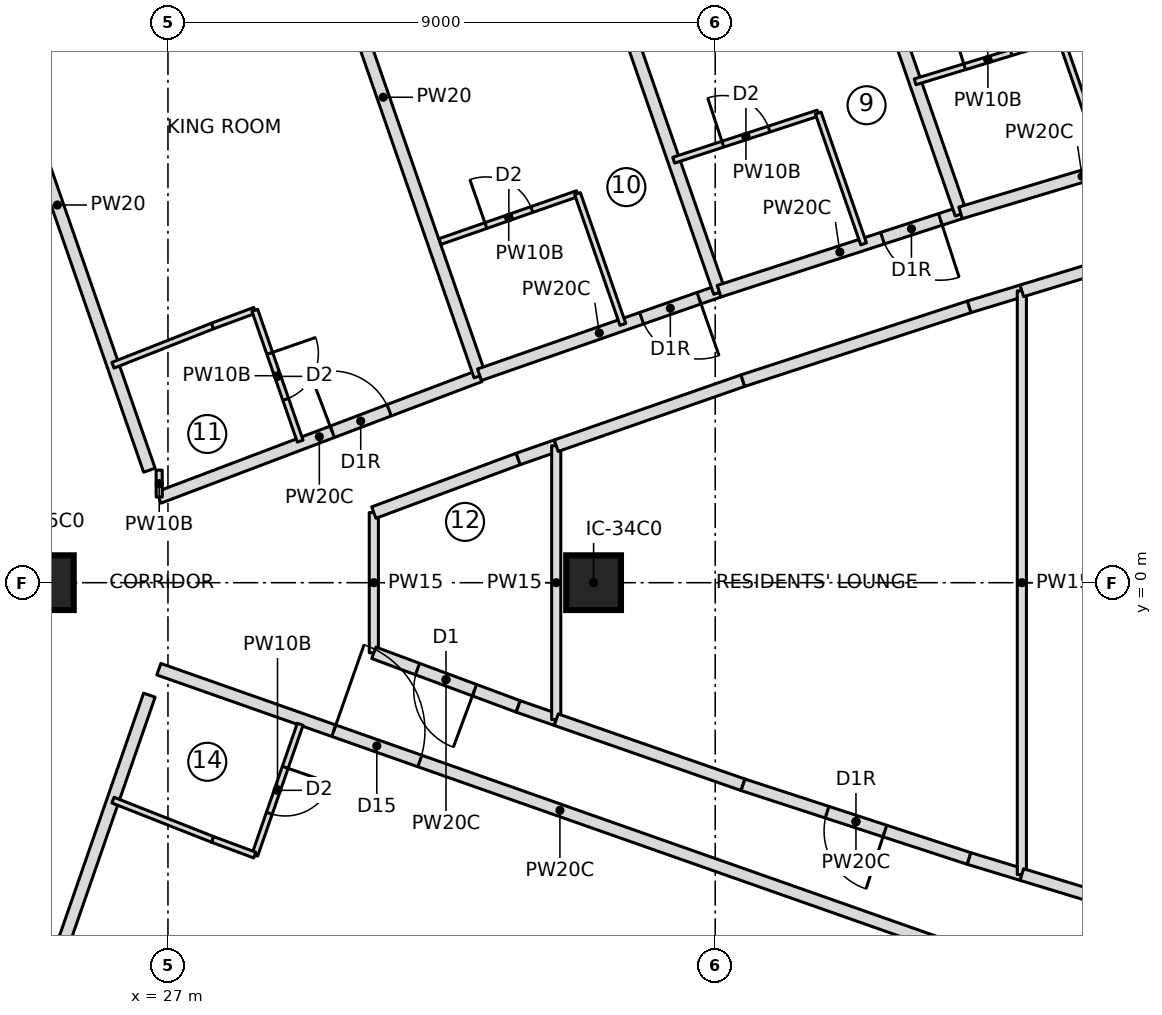
"""IFC4 building model, lengths in metres.
Left out: names, types, materials, properties, quantities, classifications, styles, units other than length and angle.
Written with IfcOpenShell. Run it as: python <this file> out.ifc"""

import sys

from ifc_helpers import new_model, si_unit, direction, frame, frame_2d, origin, origin_2d, place, context, subcontext, project, spatial, rectangle, extrude, element, fill, save


model = new_model("IFC4")
c1 = context("Model", 3, precision=1e-05, world=origin(), true_north=direction((0.0, 1.0)))
c2 = subcontext(c1, "Body", "Model", "MODEL_VIEW")
j1 = project(units=[si_unit("LENGTHUNIT", "METRE"), si_unit("PLANEANGLEUNIT", "RADIAN")], contexts=[c1])
p1 = place(None, origin())
s1 = spatial("IfcSite", under=j1, at=p1, CompositionType="ELEMENT")
p2 = place(p1, origin())
s2 = spatial("IfcBuilding", under=s1, at=p2, CompositionType="ELEMENT")
p3 = place(p2, frame((0.0, 0.0, 289.2)))
s3 = spatial("IfcBuildingStorey", under=s2, at=p3, CompositionType="ELEMENT", Elevation=289.2)
for number, where, z_axis, x_axis in (
    (1, (25.0, 0.0, 0.0), (0.0, 0.0, 1.0), (1.0, 0.0, 0.0)),
    (2, (34.0, 0.0, 0.0), (0.0, 0.0, 1.0), (1.0, 0.0, 0.0)),
):
    element("IfcColumn", number, at=place(p3, frame(where, z_axis=z_axis, x_axis=x_axis)), inside=s3, PredefinedType="COLUMN", context=c2, shape_type="SweptSolid", body=[
        extrude(rectangle(XDim=0.9, YDim=0.9, at=origin_2d()), origin(), (0.0, 0.0, 1.0), 3.55),
    ])
p4 = place(p3, frame((26.694, 1.85, 0.0), z_axis=(0.0, 0.0, 1.0), x_axis=(-0.327714422317, 0.944776829418, 0.0)))
e3 = element("IfcWall", 3, at=p4, inside=s3, PredefinedType="PARTITIONING", context=c2, shape_type="SweptSolid", body=[
    extrude(rectangle(XDim=9.233, YDim=0.2, at=frame_2d((4.617, 0.0))), origin(), (0.0, 0.0, 1.0), 3.25),
])
p5 = place(p3, frame((26.85, 1.401, 0.0), z_axis=(0.0, 0.0, 1.0), x_axis=(0.935181367748, 0.354169181912, 0.0)))
e4 = element("IfcWall", 4, at=p5, inside=s3, PredefinedType="PARTITIONING", context=c2, shape_type="SweptSolid", body=[
    extrude(rectangle(XDim=5.645, YDim=0.2, at=frame_2d((2.823, 0.0))), origin(), (0.0, 0.0, 1.0), 3.25),
])
p6 = place(p5, frame((3.05, 0.0, 0.0)))
e5 = element("IfcOpeningElement", 5, at=p6, cuts=e4, PredefinedType="OPENING", context=c2, shape_type="SweptSolid", body=[
    extrude(rectangle(XDim=1.0, YDim=2.1, at=frame_2d((0.5, 1.05))), frame((0.0, 0.11, 0.0), z_axis=(0.0, -1.0, 0.0), x_axis=(1.0, 0.0, 0.0)), (0.0, 0.0, 1.0), 0.22),
])
p7 = place(p3, frame((26.096, 3.576, 0.0), z_axis=(0.0, 0.0, 1.0), x_axis=(0.930254925629, 0.366913850028, 0.0)))
e6 = element("IfcWall", 6, at=p7, inside=s3, PredefinedType="PARTITIONING", context=c2, shape_type="SweptSolid", body=[
    extrude(rectangle(XDim=1.76, YDim=0.1, at=frame_2d((0.88, 0.0))), origin(), (0.0, 0.0, 1.0), 3.25),
])
p8 = place(p3, frame((27.733, 4.222, 0.0), z_axis=(0.0, 0.0, 1.0), x_axis=(0.937514267289, 0.347946833049, 0.0)))
e7 = element("IfcWall", 7, at=p8, inside=s3, PredefinedType="PARTITIONING", context=c2, shape_type="SweptSolid", body=[
    extrude(rectangle(XDim=0.742, YDim=0.1, at=frame_2d((0.371, 0.0))), origin(), (0.0, 0.0, 1.0), 3.25),
])
p9 = place(p3, frame((28.428, 4.48, 0.0), z_axis=(0.0, 0.0, 1.0), x_axis=(0.327718024288, -0.944775579996, 0.0)))
e8 = element("IfcWall", 8, at=p9, inside=s3, PredefinedType="PARTITIONING", context=c2, shape_type="SweptSolid", body=[
    extrude(rectangle(XDim=2.277, YDim=0.1, at=frame_2d((1.139, 0.0))), origin(), (0.0, 0.0, 1.0), 3.25),
])
p10 = place(p9, frame((0.75, 0.0, 0.0)))
e9 = element("IfcOpeningElement", 9, at=p10, cuts=e8, PredefinedType="OPENING", context=c2, shape_type="SweptSolid", body=[
    extrude(rectangle(XDim=0.8, YDim=2.1, at=frame_2d((0.4, 1.05))), frame((0.0, 0.06, 0.0), z_axis=(0.0, -1.0, 0.0), x_axis=(1.0, 0.0, 0.0)), (0.0, 0.0, 1.0), 0.12),
])
p11 = place(p3, frame((32.129, 3.401, 0.0), z_axis=(0.0, 0.0, 1.0), x_axis=(-0.327724115377, 0.944773467134, 0.0)))
e10 = element("IfcWall", 10, at=p11, inside=s3, PredefinedType="PARTITIONING", context=c2, shape_type="SweptSolid", body=[
    extrude(rectangle(XDim=9.702, YDim=0.2, at=frame_2d((4.851, 0.0))), origin(), (0.0, 0.0, 1.0), 3.25),
])
p12 = place(p3, frame((36.064, 4.794, 0.0), z_axis=(0.0, 0.0, 1.0), x_axis=(-0.944236129554, -0.329269086986, 0.0)))
e11 = element("IfcWall", 11, at=p12, inside=s3, PredefinedType="PARTITIONING", context=c2, shape_type="SweptSolid", body=[
    extrude(rectangle(XDim=4.174, YDim=0.2, at=frame_2d((2.087, 0.0))), origin(), (0.0, 0.0, 1.0), 3.25),
])
p13 = place(p12, frame((0.35, 0.0, 0.0)))
e12 = element("IfcOpeningElement", 12, at=p13, cuts=e11, PredefinedType="OPENING", context=c2, shape_type="SweptSolid", body=[
    extrude(rectangle(XDim=1.0, YDim=2.1, at=frame_2d((0.5, 1.05))), frame((0.0, 0.11, 0.0), z_axis=(0.0, -1.0, 0.0), x_axis=(1.0, 0.0, 0.0)), (0.0, 0.0, 1.0), 0.22),
])
p14 = place(p3, frame((31.473, 5.611, 0.0), z_axis=(0.0, 0.0, 1.0), x_axis=(0.944305532659, 0.329069994059, 0.0)))
e13 = element("IfcWall", 13, at=p14, inside=s3, PredefinedType="PARTITIONING", context=c2, shape_type="SweptSolid", body=[
    extrude(rectangle(XDim=2.396, YDim=0.1, at=frame_2d((1.198, 0.0))), origin(), (0.0, 0.0, 1.0), 3.25),
])
p15 = place(p14, frame((0.8, 0.0, 0.0)))
e14 = element("IfcOpeningElement", 14, at=p15, cuts=e13, PredefinedType="OPENING", context=c2, shape_type="SweptSolid", body=[
    extrude(rectangle(XDim=0.8, YDim=2.1, at=frame_2d((0.4, 1.05))), frame((0.0, 0.06, 0.0), z_axis=(0.0, -1.0, 0.0), x_axis=(1.0, 0.0, 0.0)), (0.0, 0.0, 1.0), 0.12),
])
p16 = place(p3, frame((33.735, 6.399, 0.0), z_axis=(0.0, 0.0, 1.0), x_axis=(0.32768871219, -0.944785747089, 0.0)))
e15 = element("IfcWall", 15, at=p16, inside=s3, PredefinedType="PARTITIONING", context=c2, shape_type="SweptSolid", body=[
    extrude(rectangle(XDim=2.277, YDim=0.1, at=frame_2d((1.138, 0.0))), origin(), (0.0, 0.0, 1.0), 3.25),
])
p17 = place(p3, frame((36.071, 4.775, 0.0), z_axis=(0.0, 0.0, 1.0), x_axis=(-0.327725028322, 0.94477315045, 0.0)))
e16 = element("IfcWall", 16, at=p17, inside=s3, PredefinedType="PARTITIONING", context=c2, shape_type="SweptSolid", body=[
    extrude(rectangle(XDim=9.702, YDim=0.2, at=frame_2d((4.851, 0.0))), origin(), (0.0, 0.0, 1.0), 3.25),
])
p18 = place(p3, frame((40.035, 6.083, 0.0), z_axis=(0.0, 0.0, 1.0), x_axis=(-0.951196378796, -0.308586209941, 0.0)))
e17 = element("IfcWall", 17, at=p18, inside=s3, PredefinedType="PARTITIONING", context=c2, shape_type="SweptSolid", body=[
    extrude(rectangle(XDim=4.175, YDim=0.2, at=frame_2d((2.087, 0.0))), origin(), (0.0, 0.0, 1.0), 3.25),
])
p19 = place(p18, frame((0.35, 0.0, 0.0)))
e18 = element("IfcOpeningElement", 18, at=p19, cuts=e17, PredefinedType="OPENING", context=c2, shape_type="SweptSolid", body=[
    extrude(rectangle(XDim=1.0, YDim=2.1, at=frame_2d((0.5, 1.05))), frame((0.0, 0.11, 0.0), z_axis=(0.0, -1.0, 0.0), x_axis=(1.0, 0.0, 0.0)), (0.0, 0.0, 1.0), 0.22),
])
p20 = place(p3, frame((35.317, 6.948, 0.0), z_axis=(0.0, 0.0, 1.0), x_axis=(0.950666002187, 0.310216299194, 0.0)))
e19 = element("IfcWall", 19, at=p20, inside=s3, PredefinedType="PARTITIONING", context=c2, shape_type="SweptSolid", body=[
    extrude(rectangle(XDim=2.5, YDim=0.1, at=frame_2d((1.25, 0.0))), origin(), (0.0, 0.0, 1.0), 3.25),
])
p21 = place(p20, frame((0.85, 0.0, 0.0)))
e20 = element("IfcOpeningElement", 20, at=p21, cuts=e19, PredefinedType="OPENING", context=c2, shape_type="SweptSolid", body=[
    extrude(rectangle(XDim=0.8, YDim=2.1, at=frame_2d((0.4, 1.05))), frame((0.0, 0.06, 0.0), z_axis=(0.0, -1.0, 0.0), x_axis=(1.0, 0.0, 0.0)), (0.0, 0.0, 1.0), 0.12),
])
p22 = place(p3, frame((37.694, 7.724, 0.0), z_axis=(0.0, 0.0, 1.0), x_axis=(0.327622330203, -0.944808768351, 0.0)))
e21 = element("IfcWall", 21, at=p22, inside=s3, PredefinedType="PARTITIONING", context=c2, shape_type="SweptSolid", body=[
    extrude(rectangle(XDim=2.277, YDim=0.1, at=frame_2d((1.139, 0.0))), origin(), (0.0, 0.0, 1.0), 3.25),
])
p23 = place(p3, frame((40.042, 6.064, 0.0), z_axis=(0.0, 0.0, 1.0), x_axis=(-0.327710853631, 0.944778067279, 0.0)))
e22 = element("IfcWall", 22, at=p23, inside=s3, PredefinedType="PARTITIONING", context=c2, shape_type="SweptSolid", body=[
    extrude(rectangle(XDim=9.707, YDim=0.2, at=frame_2d((4.854, 0.0))), origin(), (0.0, 0.0, 1.0), 3.25),
])
p24 = place(p3, frame((44.031, 7.286, 0.0), z_axis=(0.0, 0.0, 1.0), x_axis=(-0.957521424208, -0.288362137222, 0.0)))
e23 = element("IfcWall", 23, at=p24, inside=s3, PredefinedType="PARTITIONING", context=c2, shape_type="SweptSolid", body=[
    extrude(rectangle(XDim=4.173, YDim=0.2, at=frame_2d((2.086, 0.0))), origin(), (0.0, 0.0, 1.0), 3.25),
])
p25 = place(p24, frame((0.35, 0.0, 0.0)))
e24 = element("IfcOpeningElement", 24, at=p25, cuts=e23, PredefinedType="OPENING", context=c2, shape_type="SweptSolid", body=[
    extrude(rectangle(XDim=1.0, YDim=2.1, at=frame_2d((0.5, 1.05))), frame((0.0, 0.11, 0.0), z_axis=(0.0, -1.0, 0.0), x_axis=(1.0, 0.0, 0.0)), (0.0, 0.0, 1.0), 0.22),
])
p26 = place(p3, frame((39.288, 8.238, 0.0), z_axis=(0.0, 0.0, 1.0), x_axis=(0.956723503196, 0.290998519638, 0.0)))
e25 = element("IfcWall", 25, at=p26, inside=s3, PredefinedType="PARTITIONING", context=c2, shape_type="SweptSolid", body=[
    extrude(rectangle(XDim=2.502, YDim=0.1, at=frame_2d((1.251, 0.0))), origin(), (0.0, 0.0, 1.0), 3.25),
])
p27 = place(p26, frame((0.85, 0.0, 0.0)))
e26 = element("IfcOpeningElement", 26, at=p27, cuts=e25, PredefinedType="OPENING", context=c2, shape_type="SweptSolid", body=[
    extrude(rectangle(XDim=0.8, YDim=2.1, at=frame_2d((0.4, 1.05))), frame((0.0, 0.06, 0.0), z_axis=(0.0, -1.0, 0.0), x_axis=(1.0, 0.0, 0.0)), (0.0, 0.0, 1.0), 0.12),
])
p28 = place(p3, frame((41.681, 8.966, 0.0), z_axis=(0.0, 0.0, 1.0), x_axis=(0.327743427431, -0.944766767925, 0.0)))
e27 = element("IfcWall", 27, at=p28, inside=s3, PredefinedType="PARTITIONING", context=c2, shape_type="SweptSolid", body=[
    extrude(rectangle(XDim=2.279, YDim=0.1, at=frame_2d((1.139, 0.0))), origin(), (0.0, 0.0, 1.0), 3.25),
])
p29 = place(p3, frame((44.038, 7.267, 0.0), z_axis=(0.0, 0.0, 1.0), x_axis=(-0.327714576096, 0.944776776077, 0.0)))
e28 = element("IfcWall", 28, at=p29, inside=s3, PredefinedType="PARTITIONING", context=c2, shape_type="SweptSolid", body=[
    extrude(rectangle(XDim=9.717, YDim=0.2, at=frame_2d((4.858, 0.0))), origin(), (0.0, 0.0, 1.0), 3.25),
])
p30 = place(p3, frame((23.668, -10.573, 0.0), z_axis=(0.0, 0.0, 1.0), x_axis=(0.327714422317, 0.944776829418, 0.0)))
e29 = element("IfcWall", 29, at=p30, inside=s3, PredefinedType="PARTITIONING", context=c2, shape_type="SweptSolid", body=[
    extrude(rectangle(XDim=9.233, YDim=0.2, at=frame_2d((4.617, 0.0))), origin(), (0.0, 0.0, 1.0), 3.25),
])
p31 = place(p3, frame((26.85, -1.423, 0.0), z_axis=(0.0, 0.0, 1.0), x_axis=(0.943328585164, -0.331860182022, 0.0)))
e30 = element("IfcWall", 30, at=p31, inside=s3, PredefinedType="PARTITIONING", context=c2, shape_type="SweptSolid", body=[
    extrude(rectangle(XDim=13.984, YDim=0.2, at=frame_2d((6.992, 0.0))), origin(), (0.0, 0.0, 1.0), 3.25),
])
p32 = place(p31, frame((3.05, 0.0, 0.0)))
e31 = element("IfcOpeningElement", 31, at=p32, cuts=e30, PredefinedType="OPENING", context=c2, shape_type="SweptSolid", body=[
    extrude(rectangle(XDim=1.5, YDim=2.1, at=frame_2d((0.75, 1.05))), frame((0.0, 0.11, 0.0), z_axis=(0.0, -1.0, 0.0), x_axis=(1.0, 0.0, 0.0)), (0.0, 0.0, 1.0), 0.22),
])
p33 = place(p3, frame((29.175, -2.328, 0.0), z_axis=(0.0, 0.0, 1.0), x_axis=(-0.327718024288, -0.944775579996, 0.0)))
e32 = element("IfcWall", 32, at=p33, inside=s3, PredefinedType="PARTITIONING", context=c2, shape_type="SweptSolid", body=[
    extrude(rectangle(XDim=2.277, YDim=0.1, at=frame_2d((1.139, 0.0))), origin(), (0.0, 0.0, 1.0), 3.25),
])
p34 = place(p33, frame((0.75, 0.0, 0.0)))
e33 = element("IfcOpeningElement", 33, at=p34, cuts=e32, PredefinedType="OPENING", context=c2, shape_type="SweptSolid", body=[
    extrude(rectangle(XDim=0.8, YDim=2.1, at=frame_2d((0.4, 1.05))), frame((0.0, 0.06, 0.0), z_axis=(0.0, -1.0, 0.0), x_axis=(1.0, 0.0, 0.0)), (0.0, 0.0, 1.0), 0.12),
])
p35 = place(p3, frame((28.428, -4.48, 0.0), z_axis=(0.0, 0.0, 1.0), x_axis=(-0.937514267289, 0.347946833049, 0.0)))
e34 = element("IfcWall", 34, at=p35, inside=s3, PredefinedType="PARTITIONING", context=c2, shape_type="SweptSolid", body=[
    extrude(rectangle(XDim=0.742, YDim=0.1, at=frame_2d((0.371, 0.0))), origin(), (0.0, 0.0, 1.0), 3.25),
])
p36 = place(p3, frame((27.733, -4.222, 0.0), z_axis=(0.0, 0.0, 1.0), x_axis=(-0.930254925629, 0.366913850028, 0.0)))
e35 = element("IfcWall", 35, at=p36, inside=s3, PredefinedType="PARTITIONING", context=c2, shape_type="SweptSolid", body=[
    extrude(rectangle(XDim=1.76, YDim=0.1, at=frame_2d((0.88, 0.0))), origin(), (0.0, 0.0, 1.0), 3.25),
])
p37 = place(p3, frame((30.385, -1.153, 0.0), z_axis=(0.0, 0.0, 1.0), x_axis=(0.0, 1.0, 0.0)))
e36 = element("IfcWall", 36, at=p37, inside=s3, PredefinedType="PARTITIONING", context=c2, shape_type="SweptSolid", body=[
    extrude(rectangle(XDim=2.307, YDim=0.15, at=frame_2d((1.153, 0.0))), origin(), (0.0, 0.0, 1.0), 3.25),
])
p38 = place(p3, frame((32.76, -2.035, 0.0), z_axis=(0.0, 0.0, 1.0), x_axis=(-0.937461225735, 0.348089715797, 0.0)))
e37 = element("IfcWall", 37, at=p38, inside=s3, PredefinedType="PARTITIONING", context=c2, shape_type="SweptSolid", body=[
    extrude(rectangle(XDim=2.533, YDim=0.2, at=frame_2d((1.266, 0.0))), origin(), (0.0, 0.0, 1.0), 3.25),
])
p39 = place(p38, frame((0.766, 0.0, 0.0)))
e38 = element("IfcOpeningElement", 38, at=p39, cuts=e37, PredefinedType="OPENING", context=c2, shape_type="SweptSolid", body=[
    extrude(rectangle(XDim=1.0, YDim=2.1, at=frame_2d((0.5, 1.05))), frame((0.0, 0.11, 0.0), z_axis=(0.0, -1.0, 0.0), x_axis=(1.0, 0.0, 0.0)), (0.0, 0.0, 1.0), 0.22),
])
p40 = place(p3, frame((30.385, 1.153, 0.0), z_axis=(0.0, 0.0, 1.0), x_axis=(0.937461225735, 0.348089715797, 0.0)))
e39 = element("IfcWall", 39, at=p40, inside=s3, PredefinedType="PARTITIONING", context=c2, shape_type="SweptSolid", body=[
    extrude(rectangle(XDim=2.533, YDim=0.2, at=frame_2d((1.266, 0.0))), origin(), (0.0, 0.0, 1.0), 3.25),
])
for number, where, z_axis, x_axis in (
    (40, (32.76, 2.035, 0.0), (0.0, 0.0, 1.0), (0.944, 0.329, 0.0)),
    (41, (33.385, -2.253, 0.0), (0.0, 0.0, 1.0), (-0.944, 0.329, 0.0)),
):
    element("IfcWall", number, at=place(p3, frame(where, z_axis=z_axis, x_axis=x_axis)), inside=s3, PredefinedType="PARTITIONING", context=c2, shape_type="SweptSolid", body=[
        extrude(rectangle(XDim=0.663, YDim=0.2, at=frame_2d((0.331, 0.0))), origin(), (0.0, 0.0, 1.0), 3.25),
    ])
p41 = place(p3, frame((33.385, -2.253, 0.0), z_axis=(0.0, 0.0, 1.0), x_axis=(0.0, 1.0, 0.0)))
e42 = element("IfcWall", 42, at=p41, inside=s3, PredefinedType="PARTITIONING", context=c2, shape_type="SweptSolid", body=[
    extrude(rectangle(XDim=4.506, YDim=0.15, at=frame_2d((2.253, 0.0))), origin(), (0.0, 0.0, 1.0), 3.25),
])
p42 = place(p3, frame((40.175, -4.536, 0.0), z_axis=(0.0, 0.0, 1.0), x_axis=(-0.950709849021, 0.310081897206, 0.0)))
e43 = element("IfcWall", 43, at=p42, inside=s3, PredefinedType="PARTITIONING", context=c2, shape_type="SweptSolid", body=[
    extrude(rectangle(XDim=3.913, YDim=0.2, at=frame_2d((1.957, 0.0))), origin(), (0.0, 0.0, 1.0), 3.25),
])
p43 = place(p42, frame((1.457, 0.0, 0.0)))
e44 = element("IfcOpeningElement", 44, at=p43, cuts=e43, PredefinedType="OPENING", context=c2, shape_type="SweptSolid", body=[
    extrude(rectangle(XDim=1.0, YDim=2.1, at=frame_2d((0.5, 1.05))), frame((0.0, 0.11, 0.0), z_axis=(0.0, -1.0, 0.0), x_axis=(1.0, 0.0, 0.0)), (0.0, 0.0, 1.0), 0.22),
])
for number, where, z_axis, x_axis in (
    (45, (40.175, 4.536, 0.0), (0.0, 0.0, 1.0), (0.957, 0.291, 0.0)),
    (46, (41.043, -4.8, 0.0), (0.0, 0.0, 1.0), (-0.957, 0.291, 0.0)),
):
    element("IfcWall", number, at=place(p3, frame(where, z_axis=z_axis, x_axis=x_axis)), inside=s3, PredefinedType="PARTITIONING", context=c2, shape_type="SweptSolid", body=[
        extrude(rectangle(XDim=0.907, YDim=0.2, at=frame_2d((0.454, 0.0))), origin(), (0.0, 0.0, 1.0), 3.25),
    ])
for number, where, z_axis, x_axis in (
    (47, (36.455, -3.323, 0.0), (0.0, 0.0, 1.0), (-0.944, 0.329, 0.0)),
    (48, (33.385, 2.253, 0.0), (0.0, 0.0, 1.0), (0.944, 0.329, 0.0)),
):
    element("IfcWall", number, at=place(p3, frame(where, z_axis=z_axis, x_axis=x_axis)), inside=s3, PredefinedType="PARTITIONING", context=c2, shape_type="SweptSolid", body=[
        extrude(rectangle(XDim=3.25, YDim=0.2, at=frame_2d((1.625, 0.0))), origin(), (0.0, 0.0, 1.0), 3.25),
    ])
p44 = place(p3, frame((36.455, 3.323, 0.0), z_axis=(0.0, 0.0, 1.0), x_axis=(0.950709849021, 0.310081897206, 0.0)))
e49 = element("IfcWall", 49, at=p44, inside=s3, PredefinedType="PARTITIONING", context=c2, shape_type="SweptSolid", body=[
    extrude(rectangle(XDim=3.913, YDim=0.2, at=frame_2d((1.957, 0.0))), origin(), (0.0, 0.0, 1.0), 3.25),
])
p45 = place(p3, frame((41.043, -4.8, 0.0), z_axis=(0.0, 0.0, 1.0), x_axis=(0.0, 1.0, 0.0)))
e50 = element("IfcWall", 50, at=p45, inside=s3, PredefinedType="PARTITIONING", context=c2, shape_type="SweptSolid", body=[
    extrude(rectangle(XDim=9.6, YDim=0.15, at=frame_2d((4.8, 0.0))), origin(), (0.0, 0.0, 1.0), 3.25),
])
for number, where, z_axis, x_axis in (
    (51, (43.918, -5.675, 0.0), (0.0, 0.0, 1.0), (-0.957, 0.291, 0.0)),
    (52, (41.043, 4.8, 0.0), (0.0, 0.0, 1.0), (0.957, 0.291, 0.0)),
):
    element("IfcWall", number, at=place(p3, frame(where, z_axis=z_axis, x_axis=x_axis)), inside=s3, PredefinedType="PARTITIONING", context=c2, shape_type="SweptSolid", body=[
        extrude(rectangle(XDim=3.006, YDim=0.2, at=frame_2d((1.503, 0.0))), origin(), (0.0, 0.0, 1.0), 3.25),
    ])
p46 = place(p3, frame((26.856, 1.409, 0.0), z_axis=(0.0, 0.0, 1.0), x_axis=(-0.003863105832, 0.999992538179, 0.0)))
e53 = element("IfcWall", 53, at=p46, inside=s3, PredefinedType="PARTITIONING", context=c2, shape_type="SweptSolid", body=[
    extrude(rectangle(XDim=0.442, YDim=0.1, at=frame_2d((0.221, 0.0))), origin(), (0.0, 0.0, 1.0), 3.25),
])
p47 = place(p10, origin())
e54 = element("IfcDoor", 54, at=p47, inside=s3, OperationType="SINGLE_SWING_LEFT", PredefinedType="DOOR", context=c2, shape_type="SweptSolid", body=[
    extrude(rectangle(XDim=0.8, YDim=2.1, at=frame_2d((0.4, 1.05))), frame((0.0, 0.025, 0.0), z_axis=(0.0, -1.0, 0.0), x_axis=(1.0, 0.0, 0.0)), (0.0, 0.0, 1.0), 0.05),
])
fill(e9, e54)
p48 = place(p6, origin())
e55 = element("IfcDoor", 55, at=p48, inside=s3, OperationType="SINGLE_SWING_RIGHT", PredefinedType="DOOR", context=c2, shape_type="SweptSolid", body=[
    extrude(rectangle(XDim=1.0, YDim=2.1, at=frame_2d((0.5, 1.05))), frame((0.0, 0.025, 0.0), z_axis=(0.0, -1.0, 0.0), x_axis=(1.0, 0.0, 0.0)), (0.0, 0.0, 1.0), 0.05),
])
fill(e5, e55)
p49 = place(p15, origin())
e56 = element("IfcDoor", 56, at=p49, inside=s3, OperationType="SINGLE_SWING_LEFT", PredefinedType="DOOR", context=c2, shape_type="SweptSolid", body=[
    extrude(rectangle(XDim=0.8, YDim=2.1, at=frame_2d((0.4, 1.05))), frame((0.0, 0.025, 0.0), z_axis=(0.0, -1.0, 0.0), x_axis=(1.0, 0.0, 0.0)), (0.0, 0.0, 1.0), 0.05),
])
fill(e14, e56)
p50 = place(p13, origin())
e57 = element("IfcDoor", 57, at=p50, inside=s3, OperationType="SINGLE_SWING_RIGHT", PredefinedType="DOOR", context=c2, shape_type="SweptSolid", body=[
    extrude(rectangle(XDim=1.0, YDim=2.1, at=frame_2d((0.5, 1.05))), frame((0.0, 0.025, 0.0), z_axis=(0.0, -1.0, 0.0), x_axis=(1.0, 0.0, 0.0)), (0.0, 0.0, 1.0), 0.05),
])
fill(e12, e57)
p51 = place(p21, origin())
e58 = element("IfcDoor", 58, at=p51, inside=s3, OperationType="SINGLE_SWING_LEFT", PredefinedType="DOOR", context=c2, shape_type="SweptSolid", body=[
    extrude(rectangle(XDim=0.8, YDim=2.1, at=frame_2d((0.4, 1.05))), frame((0.0, 0.025, 0.0), z_axis=(0.0, -1.0, 0.0), x_axis=(1.0, 0.0, 0.0)), (0.0, 0.0, 1.0), 0.05),
])
fill(e20, e58)
p52 = place(p19, origin())
e59 = element("IfcDoor", 59, at=p52, inside=s3, OperationType="SINGLE_SWING_RIGHT", PredefinedType="DOOR", context=c2, shape_type="SweptSolid", body=[
    extrude(rectangle(XDim=1.0, YDim=2.1, at=frame_2d((0.5, 1.05))), frame((0.0, 0.025, 0.0), z_axis=(0.0, -1.0, 0.0), x_axis=(1.0, 0.0, 0.0)), (0.0, 0.0, 1.0), 0.05),
])
fill(e18, e59)
p53 = place(p27, origin())
e60 = element("IfcDoor", 60, at=p53, inside=s3, OperationType="SINGLE_SWING_LEFT", PredefinedType="DOOR", context=c2, shape_type="SweptSolid", body=[
    extrude(rectangle(XDim=0.8, YDim=2.1, at=frame_2d((0.4, 1.05))), frame((0.0, 0.025, 0.0), z_axis=(0.0, -1.0, 0.0), x_axis=(1.0, 0.0, 0.0)), (0.0, 0.0, 1.0), 0.05),
])
fill(e26, e60)
p54 = place(p34, origin())
e61 = element("IfcDoor", 61, at=p54, inside=s3, OperationType="SINGLE_SWING_LEFT", PredefinedType="DOOR", context=c2, shape_type="SweptSolid", body=[
    extrude(rectangle(XDim=0.8, YDim=2.1, at=frame_2d((0.4, 1.05))), frame((0.0, 0.025, 0.0), z_axis=(0.0, -1.0, 0.0), x_axis=(1.0, 0.0, 0.0)), (0.0, 0.0, 1.0), 0.05),
])
fill(e33, e61)
p55 = place(p32, origin())
e62 = element("IfcDoor", 62, at=p55, inside=s3, OperationType="DOUBLE_DOOR_SINGLE_SWING", PredefinedType="DOOR", context=c2, shape_type="SweptSolid", body=[
    extrude(rectangle(XDim=1.5, YDim=2.1, at=frame_2d((0.75, 1.05))), frame((0.0, 0.025, 0.0), z_axis=(0.0, -1.0, 0.0), x_axis=(1.0, 0.0, 0.0)), (0.0, 0.0, 1.0), 0.05),
])
fill(e31, e62)
p56 = place(p39, origin())
e63 = element("IfcDoor", 63, at=p56, inside=s3, OperationType="SINGLE_SWING_LEFT", PredefinedType="DOOR", context=c2, shape_type="SweptSolid", body=[
    extrude(rectangle(XDim=1.0, YDim=2.1, at=frame_2d((0.5, 1.05))), frame((0.0, 0.025, 0.0), z_axis=(0.0, -1.0, 0.0), x_axis=(1.0, 0.0, 0.0)), (0.0, 0.0, 1.0), 0.05),
])
fill(e38, e63)
p57 = place(p43, origin())
e64 = element("IfcDoor", 64, at=p57, inside=s3, OperationType="SINGLE_SWING_RIGHT", PredefinedType="DOOR", context=c2, shape_type="SweptSolid", body=[
    extrude(rectangle(XDim=1.0, YDim=2.1, at=frame_2d((0.5, 1.05))), frame((0.0, 0.025, 0.0), z_axis=(0.0, -1.0, 0.0), x_axis=(1.0, 0.0, 0.0)), (0.0, 0.0, 1.0), 0.05),
])
fill(e44, e64)
save(model, sys.argv[1])
